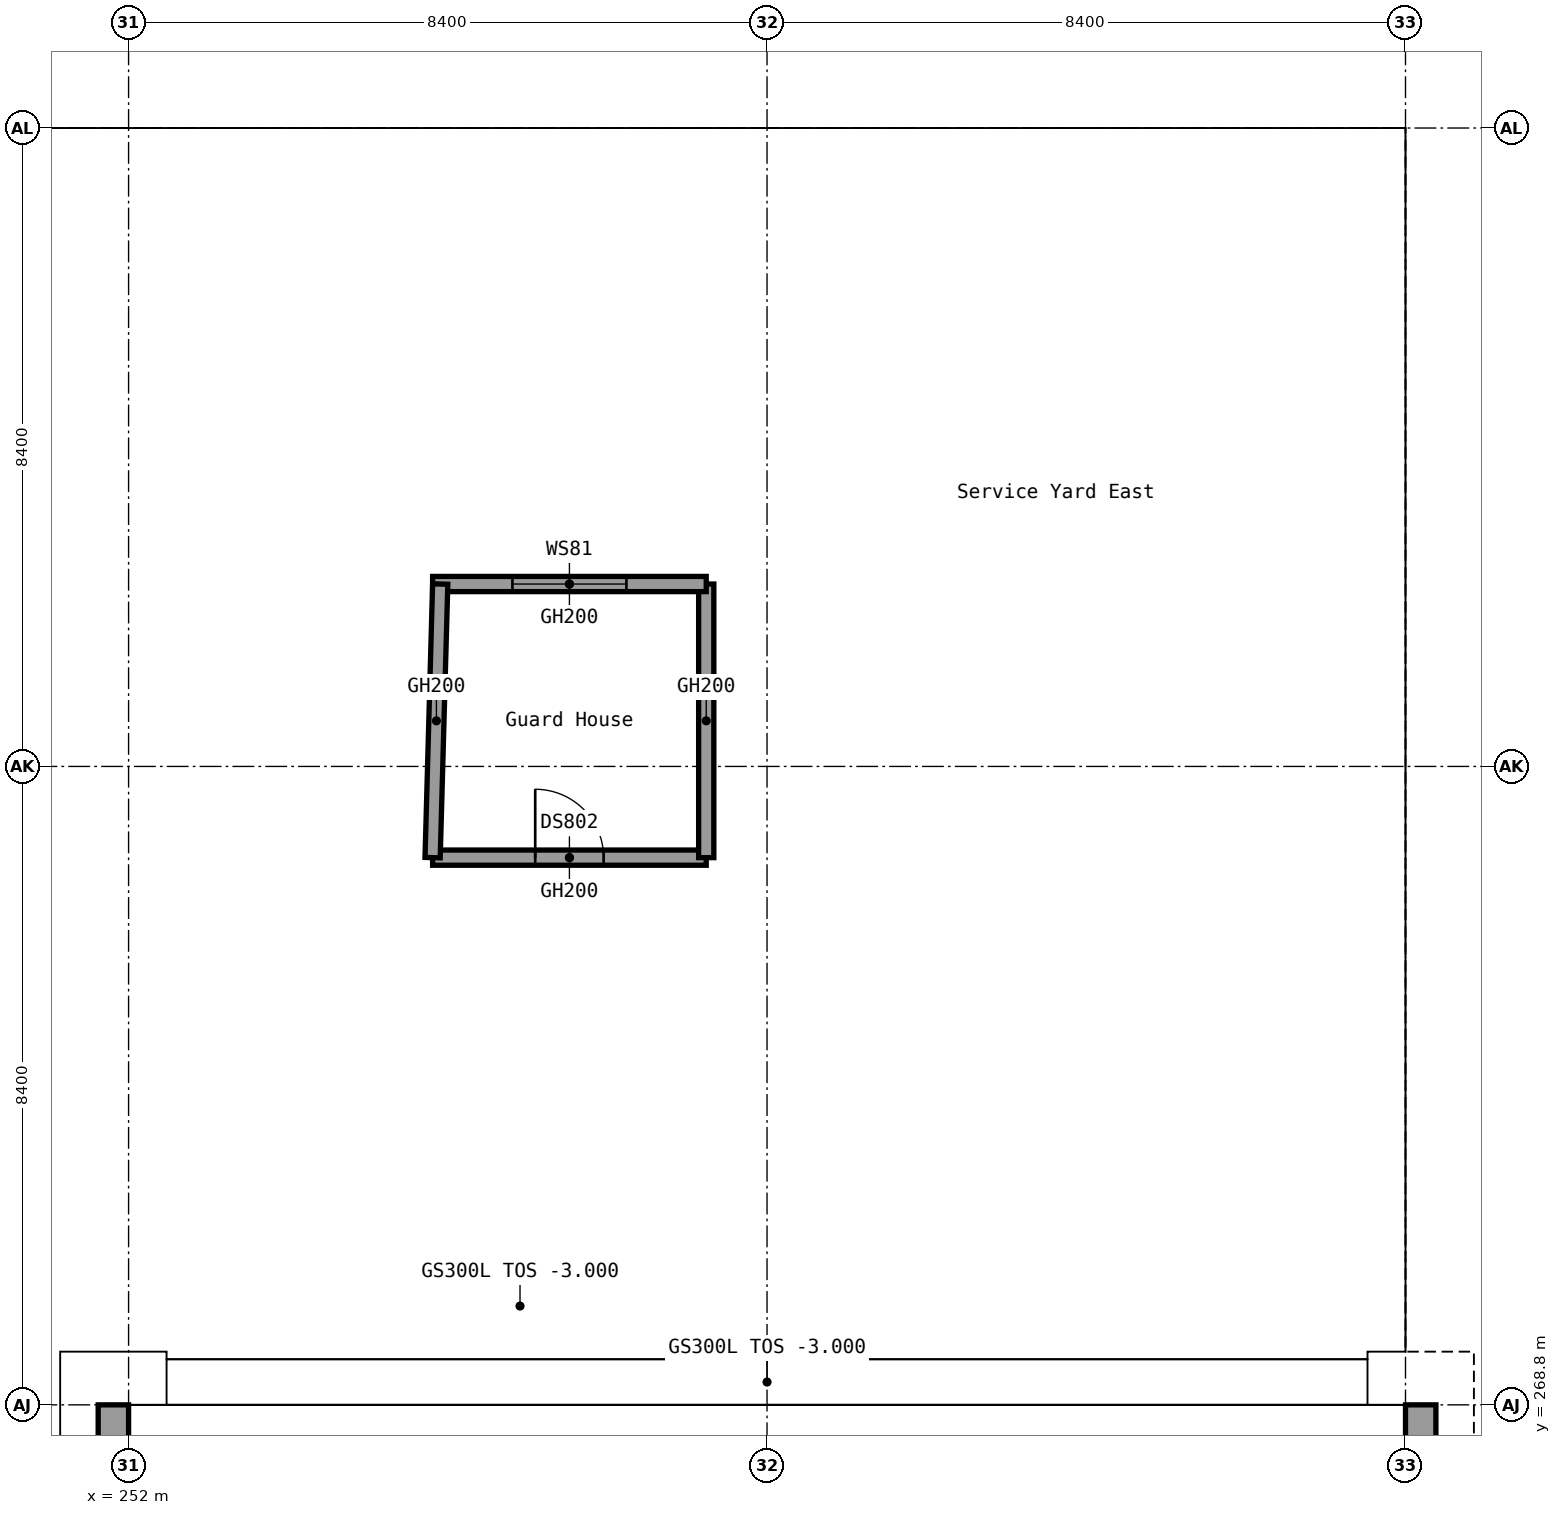
"""IFC4 building model, lengths in metres.
Left out: names, types, materials, properties, quantities, classifications, styles, units other than length and angle.
Written with IfcOpenShell. Run it as: python <this file> out.ifc"""

import sys

from ifc_helpers import new_model, si_unit, direction, frame, frame_2d, origin, place, context, subcontext, project, spatial, polyline, rectangle, outline, extrude, element, fill, save


model = new_model("IFC4")
c1 = context("Model", 3, precision=1e-05, world=origin(), true_north=direction((0.0, 1.0)))
c2 = subcontext(c1, "Body", "Model", "MODEL_VIEW")
j1 = project(units=[si_unit("LENGTHUNIT", "METRE"), si_unit("PLANEANGLEUNIT", "RADIAN")], contexts=[c1])
p1 = place(None, origin())
s1 = spatial("IfcSite", under=j1, at=p1, CompositionType="ELEMENT")
p2 = place(p1, origin())
s2 = spatial("IfcBuilding", under=s1, at=p2, CompositionType="ELEMENT")
p3 = place(p2, frame((0.0, 0.0, -3.0)))
s3 = spatial("IfcBuildingStorey", under=s2, at=p3, CompositionType="ELEMENT", Elevation=-3.0)
for number, where, z_axis, x_axis in (
    (1, (251.8, 268.8, 0.0), (0.0, 0.0, 1.0), (0.0, -1.0, 0.0)),
    (2, (269.0, 268.8, 0.0), (0.0, 0.0, 1.0), (0.0, -1.0, 0.0)),
):
    element("IfcWall", number, at=place(p3, frame(where, z_axis=z_axis, x_axis=x_axis)), inside=s3, PredefinedType="SOLIDWALL", context=c2, shape_type="SweptSolid", body=[
        extrude(outline(polyline([(0.0, 0.0), (33.6, 0.0), (33.6, 4.1), (0.0, 1.1), (0.0, 0.0)])), frame((0.0, 0.2, 0.0), z_axis=(0.0, -1.0, 0.0), x_axis=(1.0, 0.0, 0.0)), (0.0, 0.0, 1.0), 0.4),
    ])
p4 = place(p3, frame((256.0, 276.0, 0.0), z_axis=(0.0, 0.0, 1.0), x_axis=(1.0, 0.0, 0.0)))
e3 = element("IfcWall", 3, at=p4, inside=s3, PredefinedType="SOLIDWALL", context=c2, shape_type="SweptSolid", body=[
    extrude(rectangle(XDim=3.6, YDim=0.2, at=frame_2d((1.8, 0.0))), origin(), (0.0, 0.0, 1.0), 2.5),
])
p5 = place(p4, frame((1.35, 0.0, 0.0)))
e4 = element("IfcOpeningElement", 4, at=p5, cuts=e3, PredefinedType="OPENING", context=c2, shape_type="SweptSolid", body=[
    extrude(rectangle(XDim=0.9, YDim=2.1, at=frame_2d((0.45, 1.05))), frame((0.0, 0.1, 0.0), z_axis=(0.0, -1.0, 0.0), x_axis=(1.0, 0.0, 0.0)), (0.0, 0.0, 1.0), 0.2),
])
p6 = place(p3, frame((259.6, 276.0, 0.0), z_axis=(0.0, 0.0, 1.0), x_axis=(0.0, 1.0, 0.0)))
e5 = element("IfcWall", 5, at=p6, inside=s3, PredefinedType="SOLIDWALL", context=c2, shape_type="SweptSolid", body=[
    extrude(rectangle(XDim=3.6, YDim=0.2, at=frame_2d((1.8, 0.0))), origin(), (0.0, 0.0, 1.0), 2.5),
])
p7 = place(p3, frame((259.6, 279.6, 0.0), z_axis=(0.0, 0.0, 1.0), x_axis=(-1.0, 0.0, 0.0)))
e6 = element("IfcWall", 6, at=p7, inside=s3, PredefinedType="SOLIDWALL", context=c2, shape_type="SweptSolid", body=[
    extrude(rectangle(XDim=3.6, YDim=0.2, at=frame_2d((1.8, 0.0))), origin(), (0.0, 0.0, 1.0), 2.5),
])
p8 = place(p7, frame((1.05, 0.0, 0.9)))
e7 = element("IfcOpeningElement", 7, at=p8, cuts=e6, PredefinedType="OPENING", context=c2, shape_type="SweptSolid", body=[
    extrude(rectangle(XDim=1.5, YDim=1.2, at=frame_2d((0.75, 0.6))), frame((0.0, 0.1, 0.0), z_axis=(0.0, -1.0, 0.0), x_axis=(1.0, 0.0, 0.0)), (0.0, 0.0, 1.0), 0.2),
])
p9 = place(p3, frame((256.1, 279.6, 0.0), z_axis=(0.0, 0.0, 1.0), x_axis=(-0.027793409217, -0.999613688584, 0.0)))
e8 = element("IfcWall", 8, at=p9, inside=s3, PredefinedType="SOLIDWALL", context=c2, shape_type="SweptSolid", body=[
    extrude(rectangle(XDim=3.602, YDim=0.2, at=frame_2d((1.801, 0.0))), origin(), (0.0, 0.0, 1.0), 2.5),
])
p10 = place(p5, origin())
e9 = element("IfcDoor", 9, at=p10, inside=s3, OperationType="SINGLE_SWING_LEFT", PredefinedType="DOOR", context=c2, shape_type="SweptSolid", body=[
    extrude(rectangle(XDim=0.9, YDim=2.1, at=frame_2d((0.45, 1.05))), frame((0.0, 0.025, 0.0), z_axis=(0.0, -1.0, 0.0), x_axis=(1.0, 0.0, 0.0)), (0.0, 0.0, 1.0), 0.05),
])
fill(e4, e9)
p11 = place(p8, origin())
e10 = element("IfcWindow", 10, at=p11, inside=s3, PartitioningType="SINGLE_PANEL", PredefinedType="WINDOW", context=c2, shape_type="SweptSolid", body=[
    extrude(rectangle(XDim=1.5, YDim=1.2, at=frame_2d((0.75, 0.6))), frame((0.0, 0.03, 0.0), z_axis=(0.0, -1.0, 0.0), x_axis=(1.0, 0.0, 0.0)), (0.0, 0.0, 1.0), 0.06),
])
fill(e7, e10)
save(model, sys.argv[1])
